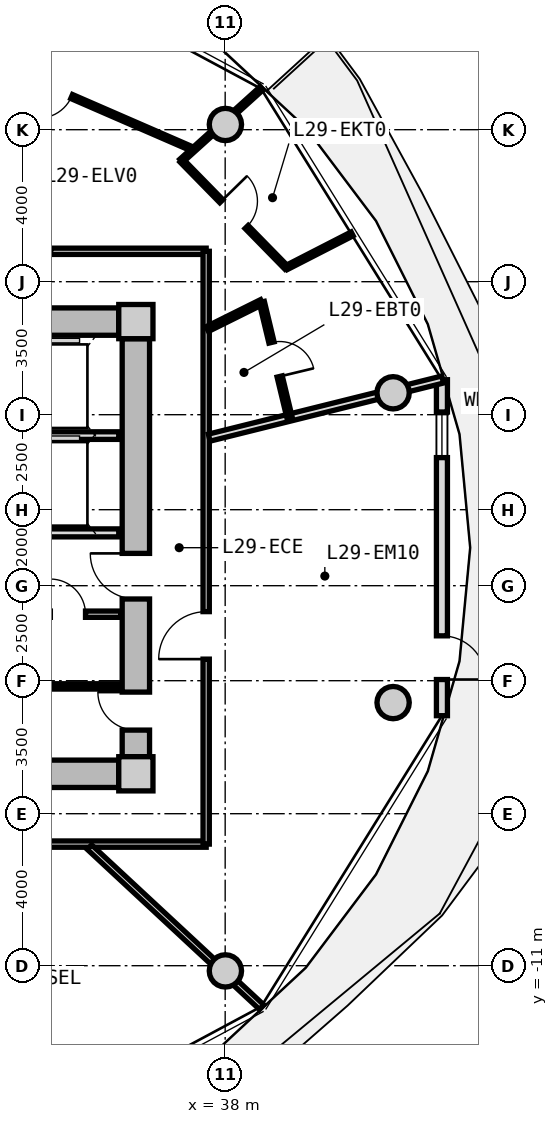
"""IFC4 building model, lengths in metres.
Left out: names, types, materials, properties, quantities, classifications, styles, units other than length and angle.
Written with IfcOpenShell. Run it as: python <this file> out.ifc"""

import sys

from ifc_helpers import new_model, si_unit, direction, frame, frame_2d, origin, origin_2d, place, context, subcontext, project, spatial, rectangle, circle, extrude, source, transform, mapped, element, fill, save


model = new_model("IFC4")
c1 = context("Model", 3, precision=1e-05, world=origin(), true_north=direction((0.0, 1.0)))
c2 = subcontext(c1, "Body", "Model", "MODEL_VIEW")
j1 = project(units=[si_unit("LENGTHUNIT", "METRE"), si_unit("PLANEANGLEUNIT", "RADIAN")], contexts=[c1])
p1 = place(None, origin())
s1 = spatial("IfcSite", under=j1, at=p1, CompositionType="ELEMENT")
p2 = place(p1, origin())
s2 = spatial("IfcBuilding", under=s1, at=p2, CompositionType="ELEMENT")
p3 = place(p2, frame((0.0, 0.0, 96.25)))
s3 = spatial("IfcBuildingStorey", under=s2, at=p3, CompositionType="ELEMENT", Elevation=96.25)
m1 = source(origin(), c2, "Body", "SweptSolid", [
    extrude(rectangle(XDim=0.9, YDim=0.9, at=origin_2d()), origin(), (0.0, 0.0, 1.0), 3.05),
])
for number, where, z_axis, x_axis in (
    (1, (35.65, -5.95, 0.0), (0.0, 0.0, 1.0), (1.0, 0.0, 0.0)),
    (2, (35.65, 5.95, 0.0), (0.0, 0.0, 1.0), (1.0, 0.0, 0.0)),
):
    element("IfcColumn", number, at=place(p3, frame(where, z_axis=z_axis, x_axis=x_axis)), inside=s3, PredefinedType="COLUMN", context=c2, shape_type="MappedRepresentation", body=[
        mapped(m1, transform((0.0, 0.0, 0.0), x_axis=(1.0, 0.0, 0.0), y_axis=(0.0, 1.0, 0.0), z_axis=(0.0, 0.0, 1.0), scale=1.0)),
    ])
m2 = source(origin(), c2, "Body", "SweptSolid", [
    extrude(rectangle(XDim=14.4, YDim=0.72, at=frame_2d((7.2, 0.0))), origin(), (0.0, 0.0, 1.0), 2.79),
])
for number, where, z_axis, x_axis in (
    (3, (20.8, 5.95, 0.0), (0.0, 0.0, 1.0), (1.0, 0.0, 0.0)),
    (4, (35.2, -5.95, 0.0), (0.0, 0.0, 1.0), (-1.0, 0.0, 0.0)),
):
    element("IfcWall", number, at=place(p3, frame(where, z_axis=z_axis, x_axis=x_axis)), inside=s3, PredefinedType="SHEAR", context=c2, shape_type="MappedRepresentation", body=[
        mapped(m2, transform((0.0, 0.0, 0.0), x_axis=(1.0, 0.0, 0.0), y_axis=(0.0, 1.0, 0.0), z_axis=(0.0, 0.0, 1.0), scale=1.0)),
    ])
m3 = source(origin(), c2, "Body", "SweptSolid", [
    extrude(rectangle(XDim=11.0, YDim=0.72, at=frame_2d((5.5, 0.0))), origin(), (0.0, 0.0, 1.0), 2.79),
])
p4 = place(p3, frame((35.65, 5.5, 0.0), z_axis=(0.0, 0.0, 1.0), x_axis=(0.0, -1.0, 0.0)))
e5 = element("IfcWall", 5, at=p4, inside=s3, PredefinedType="SHEAR", context=c2, shape_type="MappedRepresentation", body=[
    mapped(m3, transform((0.0, 0.0, 0.0), x_axis=(1.0, 0.0, 0.0), y_axis=(0.0, 1.0, 0.0), z_axis=(0.0, 0.0, 1.0), scale=1.0)),
])
p5 = place(p4, frame((5.65, 0.0, 0.0)))
e6 = element("IfcOpeningElement", 6, at=p5, cuts=e5, PredefinedType="OPENING", context=c2, shape_type="SweptSolid", body=[
    extrude(rectangle(XDim=1.2, YDim=2.15, at=frame_2d((0.6, 1.075))), frame((0.0, 0.37, 0.0), z_axis=(0.0, -1.0, 0.0), x_axis=(1.0, 0.0, 0.0)), (0.0, 0.0, 1.0), 0.74),
])
p6 = place(p4, frame((9.3, 0.0, 0.0)))
e7 = element("IfcOpeningElement", 7, at=p6, cuts=e5, PredefinedType="OPENING", context=c2, shape_type="SweptSolid", body=[
    extrude(rectangle(XDim=1.0, YDim=2.1, at=frame_2d((0.5, 1.05))), frame((0.0, 0.37, 0.0), z_axis=(0.0, -1.0, 0.0), x_axis=(1.0, 0.0, 0.0)), (0.0, 0.0, 1.0), 0.74),
])
m4 = source(origin(), c2, "Body", "SweptSolid", [
    extrude(circle(Radius=0.425, at=origin_2d()), origin(), (0.0, 0.0, 1.0), 3.05),
])
for number, where, z_axis, x_axis in (
    (8, (42.419, 4.076, 0.0), (0.0, 0.0, 1.0), (1.0, 0.0, 0.0)),
    (9, (38.006, 11.137, 0.0), (0.0, 0.0, 1.0), (1.0, 0.0, 0.0)),
    (10, (38.006, -11.137, 0.0), (0.0, 0.0, 1.0), (1.0, 0.0, 0.0)),
    (11, (42.419, -4.076, 0.0), (0.0, 0.0, 1.0), (1.0, 0.0, 0.0)),
):
    element("IfcColumn", number, at=place(p3, frame(where, z_axis=z_axis, x_axis=x_axis)), inside=s3, PredefinedType="COLUMN", context=c2, shape_type="MappedRepresentation", body=[
        mapped(m4, transform((0.0, 0.0, 0.0), x_axis=(1.0, 0.0, 0.0), y_axis=(0.0, 1.0, 0.0), z_axis=(0.0, 0.0, 1.0), scale=1.0)),
    ])
m5 = source(origin(), c2, "Body", "SweptSolid", [
    extrude(rectangle(XDim=8.841, YDim=0.29, at=frame_2d((4.421, 0.0))), origin(), (0.0, 0.0, 1.0), 2.79),
])
p7 = place(p3, frame((43.704, 4.421, 0.0), z_axis=(0.0, 0.0, 1.0), x_axis=(0.0, -1.0, 0.0)))
e12 = element("IfcWall", 12, at=p7, inside=s3, PredefinedType="SOLIDWALL", context=c2, shape_type="MappedRepresentation", body=[
    mapped(m5, transform((0.0, 0.0, 0.0), x_axis=(1.0, 0.0, 0.0), y_axis=(0.0, 1.0, 0.0), z_axis=(0.0, 0.0, 1.0), scale=1.0)),
])
p8 = place(p7, frame((6.74, 0.0, 0.0)))
e13 = element("IfcOpeningElement", 13, at=p8, cuts=e12, PredefinedType="OPENING", context=c2, shape_type="SweptSolid", body=[
    extrude(rectangle(XDim=1.15, YDim=2.25, at=frame_2d((0.575, 1.125))), frame((0.0, 0.155, 0.0), z_axis=(0.0, -1.0, 0.0), x_axis=(1.0, 0.0, 0.0)), (0.0, 0.0, 1.0), 0.31),
])
p9 = place(p7, frame((0.85, 0.0, 0.85)))
e14 = element("IfcOpeningElement", 14, at=p9, cuts=e12, PredefinedType="OPENING", context=c2, shape_type="SweptSolid", body=[
    extrude(rectangle(XDim=1.2, YDim=1.5, at=frame_2d((0.6, 0.75))), frame((0.0, 0.155, 0.0), z_axis=(0.0, -1.0, 0.0), x_axis=(1.0, 0.0, 0.0)), (0.0, 0.0, 1.0), 0.31),
])
m6 = source(origin(), c2, "Body", "SweptSolid", [
    extrude(rectangle(XDim=3.2, YDim=0.2, at=frame_2d((1.6, 0.0))), origin(), (0.0, 0.0, 1.0), 2.775),
])
p10 = place(p3, frame((32.0, 2.95, 0.0), z_axis=(0.0, 0.0, 1.0), x_axis=(1.0, 0.0, 0.0)))
e15 = element("IfcWall", 15, at=p10, inside=s3, PredefinedType="PARTITIONING", context=c2, shape_type="MappedRepresentation", body=[
    mapped(m6, transform((0.0, 0.0, 0.0), x_axis=(1.0, 0.0, 0.0), y_axis=(0.0, 1.0, 0.0), z_axis=(0.0, 0.0, 1.0), scale=1.0)),
])
m7 = source(origin(), c2, "Body", "SweptSolid", [
    extrude(rectangle(XDim=6.66, YDim=0.21, at=frame_2d((3.33, 0.0))), origin(), (0.0, 0.0, 1.0), 2.775),
])
p11 = place(p3, frame((28.54, 0.39, 0.0), z_axis=(0.0, 0.0, 1.0), x_axis=(1.0, 0.0, 0.0)))
e16 = element("IfcWall", 16, at=p11, inside=s3, PredefinedType="PARTITIONING", context=c2, shape_type="MappedRepresentation", body=[
    mapped(m7, transform((0.0, 0.0, 0.0), x_axis=(1.0, 0.0, 0.0), y_axis=(0.0, 1.0, 0.0), z_axis=(0.0, 0.0, 1.0), scale=1.0)),
])
p12 = place(p11, frame((1.0, 0.0, 0.0)))
e17 = element("IfcOpeningElement", 17, at=p12, cuts=e16, PredefinedType="OPENING", context=c2, shape_type="SweptSolid", body=[
    extrude(rectangle(XDim=1.2, YDim=2.15, at=frame_2d((0.6, 1.075))), frame((0.0, 0.115, 0.0), z_axis=(0.0, -1.0, 0.0), x_axis=(1.0, 0.0, 0.0)), (0.0, 0.0, 1.0), 0.23),
])
m8 = source(origin(), c2, "Body", "SweptSolid", [
    extrude(rectangle(XDim=2.7, YDim=0.165, at=frame_2d((1.35, 0.0))), origin(), (0.0, 0.0, 1.0), 2.775),
])
p13 = place(p3, frame((32.55, -1.75, 0.0), z_axis=(0.0, 0.0, 1.0), x_axis=(1.0, 0.0, 0.0)))
e18 = element("IfcWall", 18, at=p13, inside=s3, PredefinedType="PARTITIONING", context=c2, shape_type="MappedRepresentation", body=[
    mapped(m8, transform((0.0, 0.0, 0.0), x_axis=(1.0, 0.0, 0.0), y_axis=(0.0, 1.0, 0.0), z_axis=(0.0, 0.0, 1.0), scale=1.0)),
])
p14 = place(p13, frame((0.85, 0.0, 0.0)))
e19 = element("IfcOpeningElement", 19, at=p14, cuts=e18, PredefinedType="OPENING", context=c2, shape_type="SweptSolid", body=[
    extrude(rectangle(XDim=0.925, YDim=2.1, at=frame_2d((0.462, 1.05))), frame((0.0, 0.093, 0.0), z_axis=(0.0, -1.0, 0.0), x_axis=(1.0, 0.0, 0.0)), (0.0, 0.0, 1.0), 0.185),
])
m9 = source(origin(), c2, "Body", "SweptSolid", [
    extrude(rectangle(XDim=2.7, YDim=0.14, at=frame_2d((1.35, 0.0))), origin(), (0.0, 0.0, 1.0), 2.775),
])
p15 = place(p3, frame((32.55, -3.65, 0.0), z_axis=(0.0, 0.0, 1.0), x_axis=(1.0, 0.0, 0.0)))
e20 = element("IfcWall", 20, at=p15, inside=s3, PredefinedType="PARTITIONING", context=c2, shape_type="MappedRepresentation", body=[
    mapped(m9, transform((0.0, 0.0, 0.0), x_axis=(1.0, 0.0, 0.0), y_axis=(0.0, 1.0, 0.0), z_axis=(0.0, 0.0, 1.0), scale=1.0)),
])
m10 = source(origin(), c2, "Body", "SweptSolid", [
    extrude(rectangle(XDim=9.234, YDim=0.165, at=frame_2d((4.617, 0.0))), origin(), (0.0, 0.0, 1.0), 2.775),
])
p16 = place(p3, frame((28.266, 7.8, 0.0), z_axis=(0.0, 0.0, 1.0), x_axis=(1.0, 0.0, 0.0)))
e21 = element("IfcWall", 21, at=p16, inside=s3, PredefinedType="PARTITIONING", context=c2, shape_type="MappedRepresentation", body=[
    mapped(m10, transform((0.0, 0.0, 0.0), x_axis=(1.0, 0.0, 0.0), y_axis=(0.0, 1.0, 0.0), z_axis=(0.0, 0.0, 1.0), scale=1.0)),
])
p17 = place(p16, frame((4.092, 0.0, 0.0)))
e22 = element("IfcOpeningElement", 22, at=p17, cuts=e21, PredefinedType="OPENING", context=c2, shape_type="SweptSolid", body=[
    extrude(rectangle(XDim=1.05, YDim=2.15, at=frame_2d((0.525, 1.075))), frame((0.0, 0.093, 0.0), z_axis=(0.0, -1.0, 0.0), x_axis=(1.0, 0.0, 0.0)), (0.0, 0.0, 1.0), 0.185),
])
m11 = source(origin(), c2, "Body", "SweptSolid", [
    extrude(rectangle(XDim=8.6, YDim=0.165, at=frame_2d((4.3, 0.0))), origin(), (0.0, 0.0, 1.0), 2.775),
])
p18 = place(p3, frame((37.5, -7.8, 0.0), z_axis=(0.0, 0.0, 1.0), x_axis=(-1.0, 0.0, 0.0)))
e23 = element("IfcWall", 23, at=p18, inside=s3, PredefinedType="PARTITIONING", context=c2, shape_type="MappedRepresentation", body=[
    mapped(m11, transform((0.0, 0.0, 0.0), x_axis=(1.0, 0.0, 0.0), y_axis=(0.0, 1.0, 0.0), z_axis=(0.0, 0.0, 1.0), scale=1.0)),
])
m12 = source(origin(), c2, "Body", "SweptSolid", [
    extrude(rectangle(XDim=15.6, YDim=0.165, at=frame_2d((7.8, 0.0))), origin(), (0.0, 0.0, 1.0), 2.775),
])
p19 = place(p3, frame((37.5, 7.8, 0.0), z_axis=(0.0, 0.0, 1.0), x_axis=(0.0, -1.0, 0.0)))
e24 = element("IfcWall", 24, at=p19, inside=s3, PredefinedType="PARTITIONING", context=c2, shape_type="MappedRepresentation", body=[
    mapped(m12, transform((0.0, 0.0, 0.0), x_axis=(1.0, 0.0, 0.0), y_axis=(0.0, 1.0, 0.0), z_axis=(0.0, 0.0, 1.0), scale=1.0)),
])
p20 = place(p19, frame((9.482, 0.0, 0.0)))
e25 = element("IfcOpeningElement", 25, at=p20, cuts=e24, PredefinedType="OPENING", context=c2, shape_type="SweptSolid", body=[
    extrude(rectangle(XDim=1.25, YDim=2.2, at=frame_2d((0.625, 1.1))), frame((0.0, 0.093, 0.0), z_axis=(0.0, -1.0, 0.0), x_axis=(1.0, 0.0, 0.0)), (0.0, 0.0, 1.0), 0.185),
])
m13 = source(origin(), c2, "Body", "SweptSolid", [
    extrude(rectangle(XDim=6.187, YDim=0.165, at=frame_2d((3.093, 0.0))), origin(), (0.0, 0.0, 1.0), 2.275),
])
p21 = place(p3, frame((34.429, -7.88, 0.0), z_axis=(0.0, 0.0, 1.0), x_axis=(0.732501077882, -0.680765870841, 0.0)))
e26 = element("IfcWall", 26, at=p21, inside=s3, PredefinedType="PARTITIONING", context=c2, shape_type="MappedRepresentation", body=[
    mapped(m13, transform((0.0, 0.0, 0.0), x_axis=(1.0, 0.0, 0.0), y_axis=(0.0, 1.0, 0.0), z_axis=(0.0, 0.0, 1.0), scale=1.0)),
])
m14 = source(origin(), c2, "Body", "SweptSolid", [
    extrude(rectangle(XDim=6.331, YDim=0.19, at=frame_2d((3.165, 0.0))), origin(), (0.0, 0.0, 1.0), 2.275),
])
p22 = place(p3, frame((37.58, 2.896, 0.0), z_axis=(0.0, 0.0, 1.0), x_axis=(0.97036440661, 0.241646267062, 0.0)))
e27 = element("IfcWall", 27, at=p22, inside=s3, PredefinedType="PARTITIONING", context=c2, shape_type="MappedRepresentation", body=[
    mapped(m14, transform((0.0, 0.0, 0.0), x_axis=(1.0, 0.0, 0.0), y_axis=(0.0, 1.0, 0.0), z_axis=(0.0, 0.0, 1.0), scale=1.0)),
])
m15 = source(origin(), c2, "Body", "SweptSolid", [
    extrude(rectangle(XDim=7.938, YDim=0.115, at=frame_2d((3.969, 0.0))), origin(), (0.0, 0.0, 1.0), 2.775),
])
p23 = place(p3, frame((37.164, 10.479, 0.0), z_axis=(0.0, 0.0, 1.0), x_axis=(-0.917052940979, 0.398765474235, 0.0)))
e28 = element("IfcWall", 28, at=p23, inside=s3, PredefinedType="PARTITIONING", context=c2, shape_type="MappedRepresentation", body=[
    mapped(m15, transform((0.0, 0.0, 0.0), x_axis=(1.0, 0.0, 0.0), y_axis=(0.0, 1.0, 0.0), z_axis=(0.0, 0.0, 1.0), scale=1.0)),
])
p24 = place(p23, frame((3.494, 0.0, 0.0)))
e29 = element("IfcOpeningElement", 29, at=p24, cuts=e28, PredefinedType="OPENING", context=c2, shape_type="SweptSolid", body=[
    extrude(rectangle(XDim=0.95, YDim=2.1, at=frame_2d((0.475, 1.05))), frame((0.0, 0.067, 0.0), z_axis=(0.0, -1.0, 0.0), x_axis=(1.0, 0.0, 0.0)), (0.0, 0.0, 1.0), 0.135),
])
m16 = source(origin(), c2, "Body", "SweptSolid", [
    extrude(rectangle(XDim=2.852, YDim=0.115, at=frame_2d((1.426, 0.0))), origin(), (0.0, 0.0, 1.0), 2.275),
])
p25 = place(p3, frame((36.844, 10.18, 0.0), z_axis=(0.0, 0.0, 1.0), x_axis=(0.742190556634, 0.670188911908, 0.0)))
e30 = element("IfcWall", 30, at=p25, inside=s3, PredefinedType="PARTITIONING", context=c2, shape_type="MappedRepresentation", body=[
    mapped(m16, transform((0.0, 0.0, 0.0), x_axis=(1.0, 0.0, 0.0), y_axis=(0.0, 1.0, 0.0), z_axis=(0.0, 0.0, 1.0), scale=1.0)),
])
m17 = source(origin(), c2, "Body", "SweptSolid", [
    extrude(rectangle(XDim=1.6, YDim=0.14, at=frame_2d((0.8, 0.0))), origin(), (0.0, 0.0, 1.0), 2.775),
])
p26 = place(p3, frame((37.53, 5.754, 0.0), z_axis=(0.0, 0.0, 1.0), x_axis=(0.895522919837, 0.445015393044, 0.0)))
e31 = element("IfcWall", 31, at=p26, inside=s3, PredefinedType="PARTITIONING", context=c2, shape_type="MappedRepresentation", body=[
    mapped(m17, transform((0.0, 0.0, 0.0), x_axis=(1.0, 0.0, 0.0), y_axis=(0.0, 1.0, 0.0), z_axis=(0.0, 0.0, 1.0), scale=1.0)),
])
m18 = source(origin(), c2, "Body", "SweptSolid", [
    extrude(rectangle(XDim=3.112, YDim=0.14, at=frame_2d((1.556, 0.0))), origin(), (0.0, 0.0, 1.0), 2.415),
])
p27 = place(p3, frame((38.963, 6.466, 0.0), z_axis=(0.0, 0.0, 1.0), x_axis=(0.233737944029, -0.972299631555, 0.0)))
e32 = element("IfcWall", 32, at=p27, inside=s3, PredefinedType="PARTITIONING", context=c2, shape_type="MappedRepresentation", body=[
    mapped(m18, transform((0.0, 0.0, 0.0), x_axis=(1.0, 0.0, 0.0), y_axis=(0.0, 1.0, 0.0), z_axis=(0.0, 0.0, 1.0), scale=1.0)),
])
p28 = place(p27, frame((1.096, 0.0, 0.0)))
e33 = element("IfcOpeningElement", 33, at=p28, cuts=e32, PredefinedType="OPENING", context=c2, shape_type="SweptSolid", body=[
    extrude(rectangle(XDim=0.92, YDim=2.1, at=frame_2d((0.46, 1.05))), frame((0.0, 0.08, 0.0), z_axis=(0.0, -1.0, 0.0), x_axis=(1.0, 0.0, 0.0)), (0.0, 0.0, 1.0), 0.16),
])
m19 = source(origin(), c2, "Body", "SweptSolid", [
    extrude(rectangle(XDim=1.945, YDim=0.115, at=frame_2d((0.973, 0.0))), origin(), (0.0, 0.0, 1.0), 2.775),
])
p29 = place(p3, frame((39.611, 7.37, 0.0), z_axis=(0.0, 0.0, 1.0), x_axis=(0.889684148329, 0.456576517368, 0.0)))
e34 = element("IfcWall", 34, at=p29, inside=s3, PredefinedType="PARTITIONING", context=c2, shape_type="MappedRepresentation", body=[
    mapped(m19, transform((0.0, 0.0, 0.0), x_axis=(1.0, 0.0, 0.0), y_axis=(0.0, 1.0, 0.0), z_axis=(0.0, 0.0, 1.0), scale=1.0)),
])
m20 = source(origin(), c2, "Body", "SweptSolid", [
    extrude(rectangle(XDim=3.943, YDim=0.115, at=frame_2d((1.972, 0.0))), origin(), (0.0, 0.0, 1.0), 2.775),
])
p30 = place(p3, frame((39.611, 7.37, 0.0), z_axis=(0.0, 0.0, 1.0), x_axis=(-0.699481885754, 0.714650328134, 0.0)))
e35 = element("IfcWall", 35, at=p30, inside=s3, PredefinedType="PARTITIONING", context=c2, shape_type="MappedRepresentation", body=[
    mapped(m20, transform((0.0, 0.0, 0.0), x_axis=(1.0, 0.0, 0.0), y_axis=(0.0, 1.0, 0.0), z_axis=(0.0, 0.0, 1.0), scale=1.0)),
])
p31 = place(p30, frame((1.497, 0.0, 0.0)))
e36 = element("IfcOpeningElement", 36, at=p31, cuts=e35, PredefinedType="OPENING", context=c2, shape_type="SweptSolid", body=[
    extrude(rectangle(XDim=0.95, YDim=2.1, at=frame_2d((0.475, 1.05))), frame((0.0, 0.067, 0.0), z_axis=(0.0, -1.0, 0.0), x_axis=(1.0, 0.0, 0.0)), (0.0, 0.0, 1.0), 0.135),
])
m21 = source(origin(), c2, "Body", "SweptSolid", [
    extrude(rectangle(XDim=1.15, YDim=2.25, at=frame_2d((0.575, 1.125))), frame((0.0, 0.025, 0.0), z_axis=(0.0, -1.0, 0.0), x_axis=(1.0, 0.0, 0.0)), (0.0, 0.0, 1.0), 0.05),
])
p32 = place(p8, origin())
e37 = element("IfcDoor", 37, at=p32, inside=s3, OperationType="SINGLE_SWING_RIGHT", PredefinedType="DOOR", context=c2, shape_type="MappedRepresentation", body=[
    mapped(m21, transform((0.0, 0.0, 0.0), x_axis=(1.0, 0.0, 0.0), y_axis=(0.0, 1.0, 0.0), z_axis=(0.0, 0.0, 1.0), scale=1.0)),
])
fill(e13, e37)
m22 = source(origin(), c2, "Body", "SweptSolid", [
    extrude(rectangle(XDim=1.2, YDim=1.5, at=frame_2d((0.6, 0.75))), frame((0.0, 0.03, 0.0), z_axis=(0.0, -1.0, 0.0), x_axis=(1.0, 0.0, 0.0)), (0.0, 0.0, 1.0), 0.06),
])
p33 = place(p9, origin())
e38 = element("IfcWindow", 38, at=p33, inside=s3, PartitioningType="SINGLE_PANEL", PredefinedType="WINDOW", context=c2, shape_type="MappedRepresentation", body=[
    mapped(m22, transform((0.0, 0.0, 0.0), x_axis=(1.0, 0.0, 0.0), y_axis=(0.0, 1.0, 0.0), z_axis=(0.0, 0.0, 1.0), scale=1.0)),
])
fill(e14, e38)
m23 = source(origin(), c2, "Body", "SweptSolid", [
    extrude(rectangle(XDim=1.2, YDim=2.15, at=frame_2d((0.6, 1.075))), frame((0.0, 0.025, 0.0), z_axis=(0.0, -1.0, 0.0), x_axis=(1.0, 0.0, 0.0)), (0.0, 0.0, 1.0), 0.05),
])
p34 = place(p5, frame((1.2, 0.0, 0.0), z_axis=(0.0, 0.0, 1.0), x_axis=(-1.0, 0.0, 0.0)))
e39 = element("IfcDoor", 39, at=p34, inside=s3, OperationType="SINGLE_SWING_RIGHT", PredefinedType="DOOR", context=c2, shape_type="MappedRepresentation", body=[
    mapped(m23, transform((0.0, 0.0, 0.0), x_axis=(1.0, 0.0, 0.0), y_axis=(0.0, 1.0, 0.0), z_axis=(0.0, 0.0, 1.0), scale=1.0)),
])
fill(e6, e39)
m24 = source(origin(), c2, "Body", "SweptSolid", [
    extrude(rectangle(XDim=0.925, YDim=2.1, at=frame_2d((0.462, 1.05))), frame((0.0, 0.025, 0.0), z_axis=(0.0, -1.0, 0.0), x_axis=(1.0, 0.0, 0.0)), (0.0, 0.0, 1.0), 0.05),
])
p35 = place(p14, origin())
e40 = element("IfcDoor", 40, at=p35, inside=s3, OperationType="SINGLE_SWING_LEFT", PredefinedType="DOOR", context=c2, shape_type="MappedRepresentation", body=[
    mapped(m24, transform((0.0, 0.0, 0.0), x_axis=(1.0, 0.0, 0.0), y_axis=(0.0, 1.0, 0.0), z_axis=(0.0, 0.0, 1.0), scale=1.0)),
])
fill(e19, e40)
m25 = source(origin(), c2, "Body", "SweptSolid", [
    extrude(rectangle(XDim=1.0, YDim=2.1, at=frame_2d((0.5, 1.05))), frame((0.0, 0.025, 0.0), z_axis=(0.0, -1.0, 0.0), x_axis=(1.0, 0.0, 0.0)), (0.0, 0.0, 1.0), 0.05),
])
p36 = place(p6, frame((1.0, 0.0, 0.0), z_axis=(0.0, 0.0, 1.0), x_axis=(-1.0, 0.0, 0.0)))
e41 = element("IfcDoor", 41, at=p36, inside=s3, OperationType="SINGLE_SWING_RIGHT", PredefinedType="DOOR", context=c2, shape_type="MappedRepresentation", body=[
    mapped(m25, transform((0.0, 0.0, 0.0), x_axis=(1.0, 0.0, 0.0), y_axis=(0.0, 1.0, 0.0), z_axis=(0.0, 0.0, 1.0), scale=1.0)),
])
fill(e7, e41)
m26 = source(origin(), c2, "Body", "SweptSolid", [
    extrude(rectangle(XDim=1.25, YDim=2.2, at=frame_2d((0.625, 1.1))), frame((0.0, 0.025, 0.0), z_axis=(0.0, -1.0, 0.0), x_axis=(1.0, 0.0, 0.0)), (0.0, 0.0, 1.0), 0.05),
])
p37 = place(p20, frame((1.25, 0.0, 0.0), z_axis=(0.0, 0.0, 1.0), x_axis=(-1.0, 0.0, 0.0)))
e42 = element("IfcDoor", 42, at=p37, inside=s3, OperationType="SINGLE_SWING_LEFT", PredefinedType="DOOR", context=c2, shape_type="MappedRepresentation", body=[
    mapped(m26, transform((0.0, 0.0, 0.0), x_axis=(1.0, 0.0, 0.0), y_axis=(0.0, 1.0, 0.0), z_axis=(0.0, 0.0, 1.0), scale=1.0)),
])
fill(e25, e42)
m27 = source(origin(), c2, "Body", "SweptSolid", [
    extrude(rectangle(XDim=0.92, YDim=2.1, at=frame_2d((0.46, 1.05))), frame((0.0, 0.025, 0.0), z_axis=(0.0, -1.0, 0.0), x_axis=(1.0, 0.0, 0.0)), (0.0, 0.0, 1.0), 0.05),
])
p38 = place(p28, origin())
e43 = element("IfcDoor", 43, at=p38, inside=s3, OperationType="SINGLE_SWING_RIGHT", PredefinedType="DOOR", context=c2, shape_type="MappedRepresentation", body=[
    mapped(m27, transform((0.0, 0.0, 0.0), x_axis=(1.0, 0.0, 0.0), y_axis=(0.0, 1.0, 0.0), z_axis=(0.0, 0.0, 1.0), scale=1.0)),
])
fill(e33, e43)
m28 = source(origin(), c2, "Body", "SweptSolid", [
    extrude(rectangle(XDim=0.95, YDim=2.1, at=frame_2d((0.475, 1.05))), frame((0.0, 0.025, 0.0), z_axis=(0.0, -1.0, 0.0), x_axis=(1.0, 0.0, 0.0)), (0.0, 0.0, 1.0), 0.05),
])
p39 = place(p31, frame((0.95, 0.0, 0.0), z_axis=(0.0, 0.0, 1.0), x_axis=(-1.0, 0.0, 0.0)))
e44 = element("IfcDoor", 44, at=p39, inside=s3, OperationType="SINGLE_SWING_LEFT", PredefinedType="DOOR", context=c2, shape_type="MappedRepresentation", body=[
    mapped(m28, transform((0.0, 0.0, 0.0), x_axis=(1.0, 0.0, 0.0), y_axis=(0.0, 1.0, 0.0), z_axis=(0.0, 0.0, 1.0), scale=1.0)),
])
fill(e36, e44)
p40 = place(p24, origin())
e45 = element("IfcDoor", 45, at=p40, inside=s3, OperationType="SINGLE_SWING_RIGHT", PredefinedType="DOOR", context=c2, shape_type="MappedRepresentation", body=[
    mapped(m28, transform((0.0, 0.0, 0.0), x_axis=(1.0, 0.0, 0.0), y_axis=(0.0, 1.0, 0.0), z_axis=(0.0, 0.0, 1.0), scale=1.0)),
])
fill(e29, e45)
save(model, sys.argv[1])
